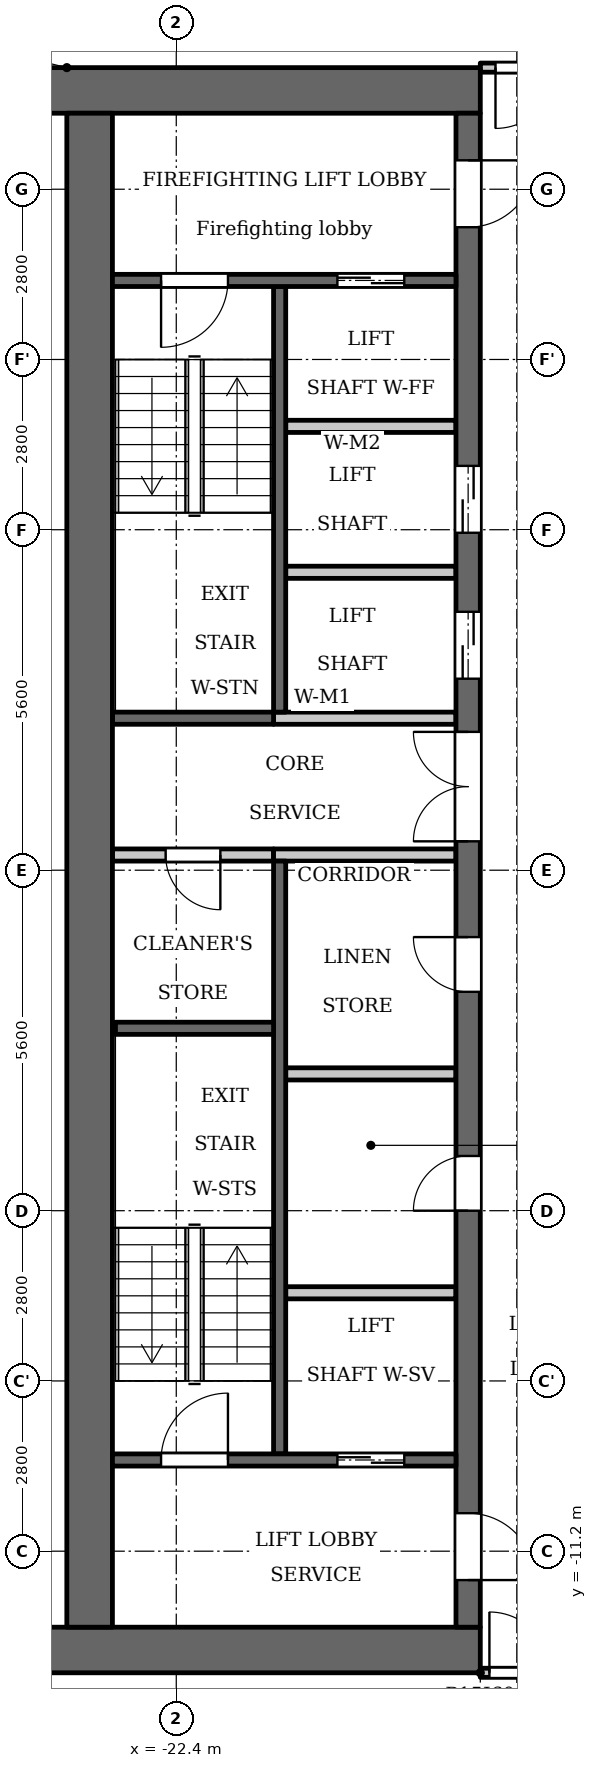
"""IFC4 building model, lengths in metres.
Left out: names, types, materials, properties, quantities, classifications, styles, units other than length and angle.
Written with IfcOpenShell. Run it as: python <this file> out.ifc"""

import sys

from ifc_helpers import new_model, si_unit, direction, frame, frame_2d, origin, place, context, subcontext, project, spatial, rectangle, extrude, element, fill, save


model = new_model("IFC4")
c1 = context("Model", 3, precision=1e-05, world=origin(), true_north=direction((0.0, 1.0)))
c2 = subcontext(c1, "Body", "Model", "MODEL_VIEW")
j1 = project(units=[si_unit("LENGTHUNIT", "METRE"), si_unit("PLANEANGLEUNIT", "RADIAN")], contexts=[c1])
p1 = place(None, origin())
s1 = spatial("IfcSite", under=j1, at=p1, CompositionType="ELEMENT")
p2 = place(p1, origin())
s2 = spatial("IfcBuilding", under=s1, at=p2, CompositionType="ELEMENT")
p3 = place(p2, frame((0.0, 0.0, 216.9)))
s3 = spatial("IfcBuildingStorey", under=s2, at=p3, CompositionType="ELEMENT", Elevation=216.9)
p4 = place(p3, frame((-20.7, 2.6, 0.0), z_axis=(0.0, 0.0, 1.0), x_axis=(0.0, 1.0, 0.0)))
e1 = element("IfcWall", 1, at=p4, inside=s3, PredefinedType="SHEAR", context=c2, shape_type="SweptSolid", body=[
    extrude(rectangle(XDim=7.0, YDim=0.2, at=frame_2d((3.5, 0.0))), origin(), (0.0, 0.0, 1.0), 3.2),
])
p5 = place(p3, frame((-20.7, -9.6, 0.0), z_axis=(0.0, 0.0, 1.0), x_axis=(0.0, 1.0, 0.0)))
e2 = element("IfcWall", 2, at=p5, inside=s3, PredefinedType="SHEAR", context=c2, shape_type="SweptSolid", body=[
    extrude(rectangle(XDim=9.75, YDim=0.2, at=frame_2d((4.875, 0.0))), origin(), (0.0, 0.0, 1.0), 3.2),
])
p6 = place(p3, frame((-20.8, 2.5, 0.0), z_axis=(0.0, 0.0, 1.0), x_axis=(-1.0, 0.0, 0.0)))
e3 = element("IfcWall", 3, at=p6, inside=s3, PredefinedType="SHEAR", context=c2, shape_type="SweptSolid", body=[
    extrude(rectangle(XDim=2.65, YDim=0.2, at=frame_2d((1.325, 0.0))), origin(), (0.0, 0.0, 1.0), 3.2),
])
p7 = place(p3, frame((-20.8, 0.25, 0.0), z_axis=(0.0, 0.0, 1.0), x_axis=(-1.0, 0.0, 0.0)))
e4 = element("IfcWall", 4, at=p7, inside=s3, PredefinedType="PARTITIONING", context=c2, shape_type="SweptSolid", body=[
    extrude(rectangle(XDim=2.65, YDim=0.2, at=frame_2d((1.325, 0.0))), origin(), (0.0, 0.0, 1.0), 3.2),
])
p8 = place(p7, frame((0.875, 0.0, 0.0)))
e5 = element("IfcOpeningElement", 5, at=p8, cuts=e4, PredefinedType="OPENING", context=c2, shape_type="SweptSolid", body=[
    extrude(rectangle(XDim=0.9, YDim=2.1, at=frame_2d((0.45, 1.05))), frame((0.0, 0.11, 0.0), z_axis=(0.0, -1.0, 0.0), x_axis=(1.0, 0.0, 0.0)), (0.0, 0.0, 1.0), 0.22),
])
for number, where, z_axis, x_axis in (
    (6, (-17.4, 12.825, 0.0), (0.0, 0.0, 1.0), (-1.0, 0.0, 0.0)),
    (7, (-17.4, -12.825, 0.0), (0.0, 0.0, 1.0), (-1.0, 0.0, 0.0)),
):
    element("IfcWall", number, at=place(p3, frame(where, z_axis=z_axis, x_axis=x_axis)), inside=s3, PredefinedType="SHEAR", context=c2, shape_type="SweptSolid", body=[
        extrude(rectangle(XDim=7.6, YDim=0.75, at=frame_2d((3.8, 0.0))), origin(), (0.0, 0.0, 1.0), 3.2),
    ])
p9 = place(p3, frame((-17.8, -3.35, 0.0), z_axis=(0.0, 0.0, 1.0), x_axis=(-1.0, 0.0, 0.0)))
e8 = element("IfcWall", 8, at=p9, inside=s3, PredefinedType="PARTITIONING", context=c2, shape_type="SweptSolid", body=[
    extrude(rectangle(XDim=2.8, YDim=0.2, at=frame_2d((1.4, 0.0))), origin(), (0.0, 0.0, 1.0), 3.2),
])
p10 = place(p3, frame((-17.6, -12.45, 0.0), z_axis=(0.0, 0.0, 1.0), x_axis=(0.0, 1.0, 0.0)))
e9 = element("IfcWall", 9, at=p10, inside=s3, PredefinedType="SHEAR", context=c2, shape_type="SweptSolid", body=[
    extrude(rectangle(XDim=24.9, YDim=0.4, at=frame_2d((12.45, 0.0))), origin(), (0.0, 0.0, 1.0), 3.2),
])
p11 = place(p10, frame((6.85, 0.0, 0.0)))
e10 = element("IfcOpeningElement", 10, at=p11, cuts=e9, PredefinedType="OPENING", context=c2, shape_type="SweptSolid", body=[
    extrude(rectangle(XDim=0.9, YDim=2.1, at=frame_2d((0.45, 1.05))), frame((0.0, 0.21, 0.0), z_axis=(0.0, -1.0, 0.0), x_axis=(1.0, 0.0, 0.0)), (0.0, 0.0, 1.0), 0.42),
])
p12 = place(p10, frame((10.45, 0.0, 0.0)))
e11 = element("IfcOpeningElement", 11, at=p12, cuts=e9, PredefinedType="OPENING", context=c2, shape_type="SweptSolid", body=[
    extrude(rectangle(XDim=0.9, YDim=2.1, at=frame_2d((0.45, 1.05))), frame((0.0, 0.21, 0.0), z_axis=(0.0, -1.0, 0.0), x_axis=(1.0, 0.0, 0.0)), (0.0, 0.0, 1.0), 0.42),
])
p13 = place(p10, frame((15.6, 0.0, 0.0)))
e12 = element("IfcOpeningElement", 12, at=p13, cuts=e9, PredefinedType="OPENING", context=c2, shape_type="SweptSolid", body=[
    extrude(rectangle(XDim=1.1, YDim=2.1, at=frame_2d((0.55, 1.05))), frame((0.0, 0.21, 0.0), z_axis=(0.0, -1.0, 0.0), x_axis=(1.0, 0.0, 0.0)), (0.0, 0.0, 1.0), 0.42),
])
p14 = place(p10, frame((18.0, 0.0, 0.0)))
e13 = element("IfcOpeningElement", 13, at=p14, cuts=e9, PredefinedType="OPENING", context=c2, shape_type="SweptSolid", body=[
    extrude(rectangle(XDim=1.1, YDim=2.1, at=frame_2d((0.55, 1.05))), frame((0.0, 0.21, 0.0), z_axis=(0.0, -1.0, 0.0), x_axis=(1.0, 0.0, 0.0)), (0.0, 0.0, 1.0), 0.42),
])
p15 = place(p10, frame((23.025, 0.0, 0.0)))
e14 = element("IfcOpeningElement", 14, at=p15, cuts=e9, PredefinedType="OPENING", context=c2, shape_type="SweptSolid", body=[
    extrude(rectangle(XDim=1.1, YDim=2.1, at=frame_2d((0.55, 1.05))), frame((0.0, 0.21, 0.0), z_axis=(0.0, -1.0, 0.0), x_axis=(1.0, 0.0, 0.0)), (0.0, 0.0, 1.0), 0.42),
])
p16 = place(p10, frame((0.775, 0.0, 0.0)))
e15 = element("IfcOpeningElement", 15, at=p16, cuts=e9, PredefinedType="OPENING", context=c2, shape_type="SweptSolid", body=[
    extrude(rectangle(XDim=1.1, YDim=2.1, at=frame_2d((0.55, 1.05))), frame((0.0, 0.21, 0.0), z_axis=(0.0, -1.0, 0.0), x_axis=(1.0, 0.0, 0.0)), (0.0, 0.0, 1.0), 0.42),
])
p17 = place(p10, frame((12.925, 0.0, 0.0)))
e16 = element("IfcOpeningElement", 16, at=p17, cuts=e9, PredefinedType="OPENING", context=c2, shape_type="SweptSolid", body=[
    extrude(rectangle(XDim=1.8, YDim=2.1, at=frame_2d((0.9, 1.05))), frame((0.0, 0.21, 0.0), z_axis=(0.0, -1.0, 0.0), x_axis=(1.0, 0.0, 0.0)), (0.0, 0.0, 1.0), 0.42),
])
p18 = place(p3, frame((-23.825, -12.45, 0.0), z_axis=(0.0, 0.0, 1.0), x_axis=(0.0, 1.0, 0.0)))
e17 = element("IfcWall", 17, at=p18, inside=s3, PredefinedType="SHEAR", context=c2, shape_type="SweptSolid", body=[
    extrude(rectangle(XDim=24.9, YDim=0.75, at=frame_2d((12.45, 0.0))), origin(), (0.0, 0.0, 1.0), 3.2),
])
p19 = place(p3, frame((-17.8, -9.7, 0.0), z_axis=(0.0, 0.0, 1.0), x_axis=(-1.0, 0.0, 0.0)))
e18 = element("IfcWall", 18, at=p19, inside=s3, PredefinedType="SHEAR", context=c2, shape_type="SweptSolid", body=[
    extrude(rectangle(XDim=5.65, YDim=0.2, at=frame_2d((2.825, 0.0))), origin(), (0.0, 0.0, 1.0), 3.2),
])
p20 = place(p19, frame((0.85, 0.0, 0.0)))
e19 = element("IfcOpeningElement", 19, at=p20, cuts=e18, PredefinedType="OPENING", context=c2, shape_type="SweptSolid", body=[
    extrude(rectangle(XDim=1.1, YDim=2.1, at=frame_2d((0.55, 1.05))), frame((0.0, 0.11, 0.0), z_axis=(0.0, -1.0, 0.0), x_axis=(1.0, 0.0, 0.0)), (0.0, 0.0, 1.0), 0.22),
])
p21 = place(p19, frame((3.75, 0.0, 0.0)))
e20 = element("IfcOpeningElement", 20, at=p21, cuts=e18, PredefinedType="OPENING", context=c2, shape_type="SweptSolid", body=[
    extrude(rectangle(XDim=1.1, YDim=2.1, at=frame_2d((0.55, 1.05))), frame((0.0, 0.11, 0.0), z_axis=(0.0, -1.0, 0.0), x_axis=(1.0, 0.0, 0.0)), (0.0, 0.0, 1.0), 0.22),
])
p22 = place(p3, frame((-17.8, -6.95, 0.0), z_axis=(0.0, 0.0, 1.0), x_axis=(-1.0, 0.0, 0.0)))
e21 = element("IfcWall", 21, at=p22, inside=s3, PredefinedType="PARTITIONING", context=c2, shape_type="SweptSolid", body=[
    extrude(rectangle(XDim=2.8, YDim=0.2, at=frame_2d((1.4, 0.0))), origin(), (0.0, 0.0, 1.0), 3.2),
])
for number, where, z_axis, x_axis in (
    (22, (-17.8, 0.25, 0.0), (0.0, 0.0, 1.0), (-1.0, 0.0, 0.0)),
    (23, (-17.8, 2.5, 0.0), (0.0, 0.0, 1.0), (-1.0, 0.0, 0.0)),
):
    element("IfcWall", number, at=place(p3, frame(where, z_axis=z_axis, x_axis=x_axis)), inside=s3, PredefinedType="PARTITIONING", context=c2, shape_type="SweptSolid", body=[
        extrude(rectangle(XDim=3.0, YDim=0.2, at=frame_2d((1.5, 0.0))), origin(), (0.0, 0.0, 1.0), 3.2),
    ])
for number, where, z_axis, x_axis in (
    (24, (-17.8, 4.9, 0.0), (0.0, 0.0, 1.0), (-1.0, 0.0, 0.0)),
    (25, (-17.8, 7.3, 0.0), (0.0, 0.0, 1.0), (-1.0, 0.0, 0.0)),
):
    element("IfcWall", number, at=place(p3, frame(where, z_axis=z_axis, x_axis=x_axis)), inside=s3, PredefinedType="PARTITIONING", context=c2, shape_type="SweptSolid", body=[
        extrude(rectangle(XDim=2.8, YDim=0.2, at=frame_2d((1.4, 0.0))), origin(), (0.0, 0.0, 1.0), 3.2),
    ])
p23 = place(p3, frame((-17.8, 9.7, 0.0), z_axis=(0.0, 0.0, 1.0), x_axis=(-1.0, 0.0, 0.0)))
e26 = element("IfcWall", 26, at=p23, inside=s3, PredefinedType="SHEAR", context=c2, shape_type="SweptSolid", body=[
    extrude(rectangle(XDim=5.65, YDim=0.2, at=frame_2d((2.825, 0.0))), origin(), (0.0, 0.0, 1.0), 3.2),
])
p24 = place(p23, frame((0.85, 0.0, 0.0)))
e27 = element("IfcOpeningElement", 27, at=p24, cuts=e26, PredefinedType="OPENING", context=c2, shape_type="SweptSolid", body=[
    extrude(rectangle(XDim=1.1, YDim=2.1, at=frame_2d((0.55, 1.05))), frame((0.0, 0.11, 0.0), z_axis=(0.0, -1.0, 0.0), x_axis=(1.0, 0.0, 0.0)), (0.0, 0.0, 1.0), 0.22),
])
p25 = place(p23, frame((3.75, 0.0, 0.0)))
e28 = element("IfcOpeningElement", 28, at=p25, cuts=e26, PredefinedType="OPENING", context=c2, shape_type="SweptSolid", body=[
    extrude(rectangle(XDim=1.1, YDim=2.1, at=frame_2d((0.55, 1.05))), frame((0.0, 0.11, 0.0), z_axis=(0.0, -1.0, 0.0), x_axis=(1.0, 0.0, 0.0)), (0.0, 0.0, 1.0), 0.22),
])
p26 = place(p3, frame((-20.8, -2.6, 0.0), z_axis=(0.0, 0.0, 1.0), x_axis=(-1.0, 0.0, 0.0)))
e29 = element("IfcWall", 29, at=p26, inside=s3, PredefinedType="SHEAR", context=c2, shape_type="SweptSolid", body=[
    extrude(rectangle(XDim=2.6, YDim=0.2, at=frame_2d((1.3, 0.0))), origin(), (0.0, 0.0, 1.0), 3.2),
])
p27 = place(p3, frame((-17.4, -13.2, 0.0), z_axis=(0.0, 0.0, 1.0), x_axis=(1.0, 0.0, 0.0)))
e30 = element("IfcWall", 30, at=p27, inside=s3, PredefinedType="PARTITIONING", context=c2, shape_type="SweptSolid", body=[
    extrude(rectangle(XDim=34.8, YDim=0.15, at=frame_2d((17.4, 0.0))), origin(), (0.0, 0.0, 1.0), 3.2),
])
p28 = place(p27, frame((0.15, 0.0, 0.0)))
e31 = element("IfcOpeningElement", 31, at=p28, cuts=e30, PredefinedType="OPENING", context=c2, shape_type="SweptSolid", body=[
    extrude(rectangle(XDim=1.0, YDim=2.1, at=frame_2d((0.5, 1.05))), frame((0.0, 0.085, 0.0), z_axis=(0.0, -1.0, 0.0), x_axis=(1.0, 0.0, 0.0)), (0.0, 0.0, 1.0), 0.17),
])
p29 = place(p27, frame((33.55, 0.0, 0.0)))
e32 = element("IfcOpeningElement", 32, at=p29, cuts=e30, PredefinedType="OPENING", context=c2, shape_type="SweptSolid", body=[
    extrude(rectangle(XDim=1.0, YDim=2.1, at=frame_2d((0.5, 1.05))), frame((0.0, 0.085, 0.0), z_axis=(0.0, -1.0, 0.0), x_axis=(1.0, 0.0, 0.0)), (0.0, 0.0, 1.0), 0.17),
])
p30 = place(p27, frame((3.7, 0.0, 0.0)))
e33 = element("IfcOpeningElement", 33, at=p30, cuts=e30, PredefinedType="OPENING", context=c2, shape_type="SweptSolid", body=[
    extrude(rectangle(XDim=1.0, YDim=2.1, at=frame_2d((0.5, 1.05))), frame((0.0, 0.085, 0.0), z_axis=(0.0, -1.0, 0.0), x_axis=(1.0, 0.0, 0.0)), (0.0, 0.0, 1.0), 0.17),
])
p31 = place(p27, frame((15.7, 0.0, 0.0)))
e34 = element("IfcOpeningElement", 34, at=p31, cuts=e30, PredefinedType="OPENING", context=c2, shape_type="SweptSolid", body=[
    extrude(rectangle(XDim=1.0, YDim=2.1, at=frame_2d((0.5, 1.05))), frame((0.0, 0.085, 0.0), z_axis=(0.0, -1.0, 0.0), x_axis=(1.0, 0.0, 0.0)), (0.0, 0.0, 1.0), 0.17),
])
p32 = place(p27, frame((21.3, 0.0, 0.0)))
e35 = element("IfcOpeningElement", 35, at=p32, cuts=e30, PredefinedType="OPENING", context=c2, shape_type="SweptSolid", body=[
    extrude(rectangle(XDim=1.0, YDim=2.1, at=frame_2d((0.5, 1.05))), frame((0.0, 0.085, 0.0), z_axis=(0.0, -1.0, 0.0), x_axis=(1.0, 0.0, 0.0)), (0.0, 0.0, 1.0), 0.17),
])
p33 = place(p27, frame((29.5, 0.0, 0.0)))
e36 = element("IfcOpeningElement", 36, at=p33, cuts=e30, PredefinedType="OPENING", context=c2, shape_type="SweptSolid", body=[
    extrude(rectangle(XDim=1.0, YDim=2.1, at=frame_2d((0.5, 1.05))), frame((0.0, 0.085, 0.0), z_axis=(0.0, -1.0, 0.0), x_axis=(1.0, 0.0, 0.0)), (0.0, 0.0, 1.0), 0.17),
])
p34 = place(p3, frame((-17.4, 13.2, 0.0), z_axis=(0.0, 0.0, 1.0), x_axis=(1.0, 0.0, 0.0)))
e37 = element("IfcWall", 37, at=p34, inside=s3, PredefinedType="PARTITIONING", context=c2, shape_type="SweptSolid", body=[
    extrude(rectangle(XDim=34.8, YDim=0.15, at=frame_2d((17.4, 0.0))), origin(), (0.0, 0.0, 1.0), 3.2),
])
p35 = place(p34, frame((0.25, 0.0, 0.0)))
e38 = element("IfcOpeningElement", 38, at=p35, cuts=e37, PredefinedType="OPENING", context=c2, shape_type="SweptSolid", body=[
    extrude(rectangle(XDim=1.0, YDim=2.1, at=frame_2d((0.5, 1.05))), frame((0.0, 0.085, 0.0), z_axis=(0.0, -1.0, 0.0), x_axis=(1.0, 0.0, 0.0)), (0.0, 0.0, 1.0), 0.17),
])
p36 = place(p34, frame((33.65, 0.0, 0.0)))
e39 = element("IfcOpeningElement", 39, at=p36, cuts=e37, PredefinedType="OPENING", context=c2, shape_type="SweptSolid", body=[
    extrude(rectangle(XDim=1.0, YDim=2.1, at=frame_2d((0.5, 1.05))), frame((0.0, 0.085, 0.0), z_axis=(0.0, -1.0, 0.0), x_axis=(1.0, 0.0, 0.0)), (0.0, 0.0, 1.0), 0.17),
])
p37 = place(p34, frame((15.75, 0.0, 0.0)))
e40 = element("IfcOpeningElement", 40, at=p37, cuts=e37, PredefinedType="OPENING", context=c2, shape_type="SweptSolid", body=[
    extrude(rectangle(XDim=1.0, YDim=2.1, at=frame_2d((0.5, 1.05))), frame((0.0, 0.085, 0.0), z_axis=(0.0, -1.0, 0.0), x_axis=(1.0, 0.0, 0.0)), (0.0, 0.0, 1.0), 0.17),
])
p38 = place(p34, frame((26.95, 0.0, 0.0)))
e41 = element("IfcOpeningElement", 41, at=p38, cuts=e37, PredefinedType="OPENING", context=c2, shape_type="SweptSolid", body=[
    extrude(rectangle(XDim=1.0, YDim=2.1, at=frame_2d((0.5, 1.05))), frame((0.0, 0.085, 0.0), z_axis=(0.0, -1.0, 0.0), x_axis=(1.0, 0.0, 0.0)), (0.0, 0.0, 1.0), 0.17),
])
p39 = place(p34, frame((29.75, 0.0, 0.0)))
e42 = element("IfcOpeningElement", 42, at=p39, cuts=e37, PredefinedType="OPENING", context=c2, shape_type="SweptSolid", body=[
    extrude(rectangle(XDim=1.0, YDim=2.1, at=frame_2d((0.5, 1.05))), frame((0.0, 0.085, 0.0), z_axis=(0.0, -1.0, 0.0), x_axis=(1.0, 0.0, 0.0)), (0.0, 0.0, 1.0), 0.17),
])
p40 = place(p20, origin())
e43 = element("IfcDoor", 43, at=p40, inside=s3, OperationType="DOUBLE_DOOR_SLIDING", PredefinedType="DOOR", context=c2, shape_type="SweptSolid", body=[
    extrude(rectangle(XDim=1.1, YDim=2.1, at=frame_2d((0.55, 1.05))), frame((0.0, 0.025, 0.0), z_axis=(0.0, -1.0, 0.0), x_axis=(1.0, 0.0, 0.0)), (0.0, 0.0, 1.0), 0.05),
])
fill(e19, e43)
p41 = place(p11, origin())
e44 = element("IfcDoor", 44, at=p41, inside=s3, OperationType="SINGLE_SWING_RIGHT", PredefinedType="DOOR", context=c2, shape_type="SweptSolid", body=[
    extrude(rectangle(XDim=0.9, YDim=2.1, at=frame_2d((0.45, 1.05))), frame((0.0, 0.025, 0.0), z_axis=(0.0, -1.0, 0.0), x_axis=(1.0, 0.0, 0.0)), (0.0, 0.0, 1.0), 0.05),
])
fill(e10, e44)
p42 = place(p12, origin())
e45 = element("IfcDoor", 45, at=p42, inside=s3, OperationType="SINGLE_SWING_LEFT", PredefinedType="DOOR", context=c2, shape_type="SweptSolid", body=[
    extrude(rectangle(XDim=0.9, YDim=2.1, at=frame_2d((0.45, 1.05))), frame((0.0, 0.025, 0.0), z_axis=(0.0, -1.0, 0.0), x_axis=(1.0, 0.0, 0.0)), (0.0, 0.0, 1.0), 0.05),
])
fill(e11, e45)
p43 = place(p13, origin())
e46 = element("IfcDoor", 46, at=p43, inside=s3, OperationType="DOUBLE_DOOR_SLIDING", PredefinedType="DOOR", context=c2, shape_type="SweptSolid", body=[
    extrude(rectangle(XDim=1.1, YDim=2.1, at=frame_2d((0.55, 1.05))), frame((0.0, 0.025, 0.0), z_axis=(0.0, -1.0, 0.0), x_axis=(1.0, 0.0, 0.0)), (0.0, 0.0, 1.0), 0.05),
])
fill(e12, e46)
p44 = place(p14, origin())
e47 = element("IfcDoor", 47, at=p44, inside=s3, OperationType="DOUBLE_DOOR_SLIDING", PredefinedType="DOOR", context=c2, shape_type="SweptSolid", body=[
    extrude(rectangle(XDim=1.1, YDim=2.1, at=frame_2d((0.55, 1.05))), frame((0.0, 0.025, 0.0), z_axis=(0.0, -1.0, 0.0), x_axis=(1.0, 0.0, 0.0)), (0.0, 0.0, 1.0), 0.05),
])
fill(e13, e47)
p45 = place(p24, origin())
e48 = element("IfcDoor", 48, at=p45, inside=s3, OperationType="DOUBLE_DOOR_SLIDING", PredefinedType="DOOR", context=c2, shape_type="SweptSolid", body=[
    extrude(rectangle(XDim=1.1, YDim=2.1, at=frame_2d((0.55, 1.05))), frame((0.0, 0.025, 0.0), z_axis=(0.0, -1.0, 0.0), x_axis=(1.0, 0.0, 0.0)), (0.0, 0.0, 1.0), 0.05),
])
fill(e27, e48)
p46 = place(p15, origin())
e49 = element("IfcDoor", 49, at=p46, inside=s3, OperationType="SINGLE_SWING_RIGHT", PredefinedType="DOOR", context=c2, shape_type="SweptSolid", body=[
    extrude(rectangle(XDim=1.1, YDim=2.1, at=frame_2d((0.55, 1.05))), frame((0.0, 0.025, 0.0), z_axis=(0.0, -1.0, 0.0), x_axis=(1.0, 0.0, 0.0)), (0.0, 0.0, 1.0), 0.05),
])
fill(e14, e49)
p47 = place(p16, origin())
e50 = element("IfcDoor", 50, at=p47, inside=s3, OperationType="SINGLE_SWING_LEFT", PredefinedType="DOOR", context=c2, shape_type="SweptSolid", body=[
    extrude(rectangle(XDim=1.1, YDim=2.1, at=frame_2d((0.55, 1.05))), frame((0.0, 0.025, 0.0), z_axis=(0.0, -1.0, 0.0), x_axis=(1.0, 0.0, 0.0)), (0.0, 0.0, 1.0), 0.05),
])
fill(e15, e50)
p48 = place(p25, origin())
e51 = element("IfcDoor", 51, at=p48, inside=s3, OperationType="SINGLE_SWING_LEFT", PredefinedType="DOOR", context=c2, shape_type="SweptSolid", body=[
    extrude(rectangle(XDim=1.1, YDim=2.1, at=frame_2d((0.55, 1.05))), frame((0.0, 0.025, 0.0), z_axis=(0.0, -1.0, 0.0), x_axis=(1.0, 0.0, 0.0)), (0.0, 0.0, 1.0), 0.05),
])
fill(e28, e51)
p49 = place(p21, origin())
e52 = element("IfcDoor", 52, at=p49, inside=s3, OperationType="SINGLE_SWING_LEFT", PredefinedType="DOOR", context=c2, shape_type="SweptSolid", body=[
    extrude(rectangle(XDim=1.1, YDim=2.1, at=frame_2d((0.55, 1.05))), frame((0.0, 0.025, 0.0), z_axis=(0.0, -1.0, 0.0), x_axis=(1.0, 0.0, 0.0)), (0.0, 0.0, 1.0), 0.05),
])
fill(e20, e52)
p50 = place(p17, origin())
e53 = element("IfcDoor", 53, at=p50, inside=s3, OperationType="DOUBLE_DOOR_SINGLE_SWING", PredefinedType="DOOR", context=c2, shape_type="SweptSolid", body=[
    extrude(rectangle(XDim=1.8, YDim=2.1, at=frame_2d((0.9, 1.05))), frame((0.0, 0.025, 0.0), z_axis=(0.0, -1.0, 0.0), x_axis=(1.0, 0.0, 0.0)), (0.0, 0.0, 1.0), 0.05),
])
fill(e16, e53)
p51 = place(p8, origin())
e54 = element("IfcDoor", 54, at=p51, inside=s3, OperationType="SINGLE_SWING_RIGHT", PredefinedType="DOOR", context=c2, shape_type="SweptSolid", body=[
    extrude(rectangle(XDim=0.9, YDim=2.1, at=frame_2d((0.45, 1.05))), frame((0.0, 0.025, 0.0), z_axis=(0.0, -1.0, 0.0), x_axis=(1.0, 0.0, 0.0)), (0.0, 0.0, 1.0), 0.05),
])
fill(e5, e54)
p52 = place(p35, origin())
e55 = element("IfcDoor", 55, at=p52, inside=s3, OperationType="SINGLE_SWING_LEFT", PredefinedType="DOOR", context=c2, shape_type="SweptSolid", body=[
    extrude(rectangle(XDim=1.0, YDim=2.1, at=frame_2d((0.5, 1.05))), frame((0.0, 0.025, 0.0), z_axis=(0.0, -1.0, 0.0), x_axis=(1.0, 0.0, 0.0)), (0.0, 0.0, 1.0), 0.05),
])
fill(e38, e55)
p53 = place(p28, origin())
e56 = element("IfcDoor", 56, at=p53, inside=s3, OperationType="SINGLE_SWING_RIGHT", PredefinedType="DOOR", context=c2, shape_type="SweptSolid", body=[
    extrude(rectangle(XDim=1.0, YDim=2.1, at=frame_2d((0.5, 1.05))), frame((0.0, 0.025, 0.0), z_axis=(0.0, -1.0, 0.0), x_axis=(1.0, 0.0, 0.0)), (0.0, 0.0, 1.0), 0.05),
])
fill(e31, e56)
save(model, sys.argv[1])
